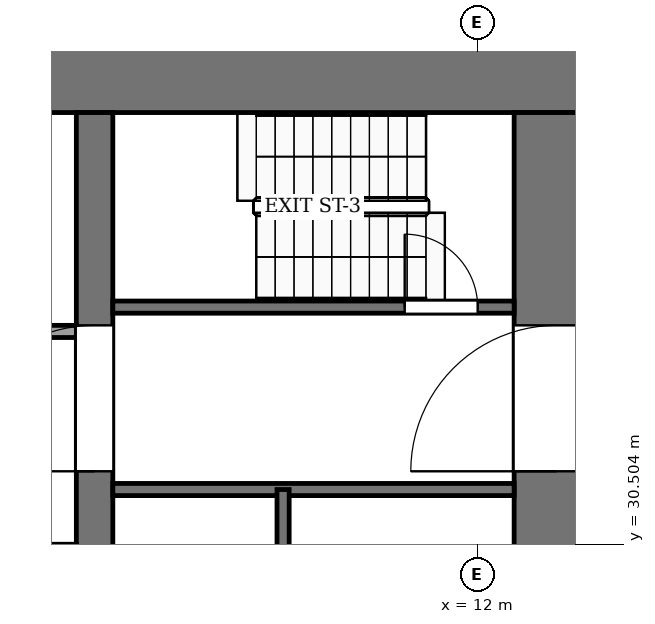
"""IFC4 building model, lengths in metres.
Left out: names, types, materials, properties, quantities, classifications, styles, units other than length and angle.
Written with IfcOpenShell. Run it as: python <this file> out.ifc"""

import sys

from ifc_helpers import new_model, si_unit, direction, frame, frame_2d, origin, place, context, subcontext, project, spatial, rectangle, extrude, element, fill, save


model = new_model("IFC4")
c1 = context("Model", 3, precision=1e-05, world=origin(), true_north=direction((0.0, 1.0)))
c2 = subcontext(c1, "Body", "Model", "MODEL_VIEW")
j1 = project(units=[si_unit("LENGTHUNIT", "METRE"), si_unit("PLANEANGLEUNIT", "RADIAN")], contexts=[c1])
p1 = place(None, origin())
s1 = spatial("IfcSite", under=j1, at=p1, CompositionType="ELEMENT")
p2 = place(p1, origin())
s2 = spatial("IfcBuilding", under=s1, at=p2, CompositionType="ELEMENT")
p3 = place(p2, frame((0.0, 0.0, 58.0)))
s3 = spatial("IfcBuildingStorey", under=s2, at=p3, CompositionType="ELEMENT", Elevation=58.0)
p4 = place(p3, frame((-14.0, 38.3, -0.25), z_axis=(0.0, 0.0, 1.0), x_axis=(1.0, 0.0, 0.0)))
e1 = element("IfcWall", 1, at=p4, inside=s3, PredefinedType="SHEAR", context=c2, shape_type="SweptSolid", body=[
    extrude(rectangle(XDim=28.0, YDim=1.4, at=frame_2d((14.0, 0.0))), origin(), (0.0, 0.0, 1.0), 7.12),
])
p5 = place(p3, frame((13.3, 18.4, -0.25), z_axis=(0.0, 0.0, 1.0), x_axis=(0.0, 1.0, 0.0)))
e2 = element("IfcWall", 2, at=p5, inside=s3, PredefinedType="SHEAR", context=c2, shape_type="SweptSolid", body=[
    extrude(rectangle(XDim=19.2, YDim=1.4, at=frame_2d((9.6, 0.0))), origin(), (0.0, 0.0, 1.0), 7.12),
])
p6 = place(p5, frame((2.8, 0.0, 0.25)))
e3 = element("IfcOpeningElement", 3, at=p6, cuts=e2, PredefinedType="OPENING", context=c2, shape_type="SweptSolid", body=[
    extrude(rectangle(XDim=2.4, YDim=2.4, at=frame_2d((1.2, 1.2))), frame((0.0, 0.71, 0.0), z_axis=(0.0, -1.0, 0.0), x_axis=(1.0, 0.0, 0.0)), (0.0, 0.0, 1.0), 1.42),
])
p7 = place(p5, frame((13.3, 0.0, 0.25)))
e4 = element("IfcOpeningElement", 4, at=p7, cuts=e2, PredefinedType="OPENING", context=c2, shape_type="SweptSolid", body=[
    extrude(rectangle(XDim=2.4, YDim=2.4, at=frame_2d((1.2, 1.2))), frame((0.0, 0.71, 0.0), z_axis=(0.0, -1.0, 0.0), x_axis=(1.0, 0.0, 0.0)), (0.0, 0.0, 1.0), 1.42),
])
p8 = place(p3, frame((5.7, 18.4, -0.25), z_axis=(0.0, 0.0, 1.0), x_axis=(0.0, 1.0, 0.0)))
e5 = element("IfcWall", 5, at=p8, inside=s3, PredefinedType="SHEAR", context=c2, shape_type="SweptSolid", body=[
    extrude(rectangle(XDim=19.2, YDim=0.6, at=frame_2d((9.6, 0.0))), origin(), (0.0, 0.0, 1.0), 7.12),
])
p9 = place(p8, frame((13.3, 0.0, 0.25)))
e6 = element("IfcOpeningElement", 6, at=p9, cuts=e5, PredefinedType="OPENING", context=c2, shape_type="SweptSolid", body=[
    extrude(rectangle(XDim=2.4, YDim=2.4, at=frame_2d((1.2, 1.2))), frame((0.0, 0.31, 0.0), z_axis=(0.0, -1.0, 0.0), x_axis=(1.0, 0.0, 0.0)), (0.0, 0.0, 1.0), 0.62),
])
p10 = place(p3, frame((6.0, 31.4, 0.0), z_axis=(0.0, 0.0, 1.0), x_axis=(1.0, 0.0, 0.0)))
e7 = element("IfcWall", 7, at=p10, inside=s3, PredefinedType="PARTITIONING", context=c2, shape_type="SweptSolid", body=[
    extrude(rectangle(XDim=6.6, YDim=0.2, at=frame_2d((3.3, 0.0))), origin(), (0.0, 0.0, 1.0), 6.87),
])
p11 = place(p3, frame((-5.4, 34.0, 0.0), z_axis=(0.0, 0.0, 1.0), x_axis=(1.0, 0.0, 0.0)))
e8 = element("IfcWall", 8, at=p11, inside=s3, PredefinedType="PARTITIONING", context=c2, shape_type="SweptSolid", body=[
    extrude(rectangle(XDim=10.8, YDim=0.2, at=frame_2d((5.4, 0.0))), origin(), (0.0, 0.0, 1.0), 6.87),
])
p12 = place(p11, frame((6.15, 0.0, 0.0)))
e9 = element("IfcOpeningElement", 9, at=p12, cuts=e8, PredefinedType="OPENING", context=c2, shape_type="SweptSolid", body=[
    extrude(rectangle(XDim=1.2, YDim=2.2, at=frame_2d((0.6, 1.1))), frame((0.0, 0.11, 0.0), z_axis=(0.0, -1.0, 0.0), x_axis=(1.0, 0.0, 0.0)), (0.0, 0.0, 1.0), 0.22),
])
p13 = place(p11, frame((8.95, 0.0, 0.0)))
e10 = element("IfcOpeningElement", 10, at=p13, cuts=e8, PredefinedType="OPENING", context=c2, shape_type="SweptSolid", body=[
    extrude(rectangle(XDim=1.0, YDim=2.1, at=frame_2d((0.5, 1.05))), frame((0.0, 0.11, 0.0), z_axis=(0.0, -1.0, 0.0), x_axis=(1.0, 0.0, 0.0)), (0.0, 0.0, 1.0), 0.22),
])
p14 = place(p3, frame((6.0, 34.4, 0.0), z_axis=(0.0, 0.0, 1.0), x_axis=(1.0, 0.0, 0.0)))
e11 = element("IfcWall", 11, at=p14, inside=s3, PredefinedType="PARTITIONING", context=c2, shape_type="SweptSolid", body=[
    extrude(rectangle(XDim=6.6, YDim=0.2, at=frame_2d((3.3, 0.0))), origin(), (0.0, 0.0, 1.0), 6.87),
])
p15 = place(p14, frame((4.8, 0.0, 0.0)))
e12 = element("IfcOpeningElement", 12, at=p15, cuts=e11, PredefinedType="OPENING", context=c2, shape_type="SweptSolid", body=[
    extrude(rectangle(XDim=1.2, YDim=2.2, at=frame_2d((0.6, 1.1))), frame((0.0, 0.11, 0.0), z_axis=(0.0, -1.0, 0.0), x_axis=(1.0, 0.0, 0.0)), (0.0, 0.0, 1.0), 0.22),
])
p16 = place(p3, frame((8.8, 24.0, 0.0), z_axis=(0.0, 0.0, 1.0), x_axis=(0.0, 1.0, 0.0)))
e13 = element("IfcWall", 13, at=p16, inside=s3, PredefinedType="PARTITIONING", context=c2, shape_type="SweptSolid", body=[
    extrude(rectangle(XDim=7.4, YDim=0.2, at=frame_2d((3.7, 0.0))), origin(), (0.0, 0.0, 1.0), 6.87),
])
p17 = place(p15, origin())
e14 = element("IfcDoor", 14, at=p17, inside=s3, OperationType="SINGLE_SWING_RIGHT", PredefinedType="DOOR", context=c2, shape_type="SweptSolid", body=[
    extrude(rectangle(XDim=1.2, YDim=2.2, at=frame_2d((0.6, 1.1))), frame((0.0, 0.025, 0.0), z_axis=(0.0, -1.0, 0.0), x_axis=(1.0, 0.0, 0.0)), (0.0, 0.0, 1.0), 0.05),
])
fill(e12, e14)
p18 = place(p9, origin())
e15 = element("IfcDoor", 15, at=p18, inside=s3, OperationType="DOUBLE_DOOR_SINGLE_SWING", PredefinedType="DOOR", context=c2, shape_type="SweptSolid", body=[
    extrude(rectangle(XDim=2.4, YDim=2.4, at=frame_2d((1.2, 1.2))), frame((0.0, 0.025, 0.0), z_axis=(0.0, -1.0, 0.0), x_axis=(1.0, 0.0, 0.0)), (0.0, 0.0, 1.0), 0.05),
])
fill(e6, e15)
p19 = place(p7, origin())
e16 = element("IfcDoor", 16, at=p19, inside=s3, OperationType="DOUBLE_DOOR_SINGLE_SWING", PredefinedType="DOOR", context=c2, shape_type="SweptSolid", body=[
    extrude(rectangle(XDim=2.4, YDim=2.4, at=frame_2d((1.2, 1.2))), frame((0.0, 0.025, 0.0), z_axis=(0.0, -1.0, 0.0), x_axis=(1.0, 0.0, 0.0)), (0.0, 0.0, 1.0), 0.05),
])
fill(e4, e16)
save(model, sys.argv[1])
